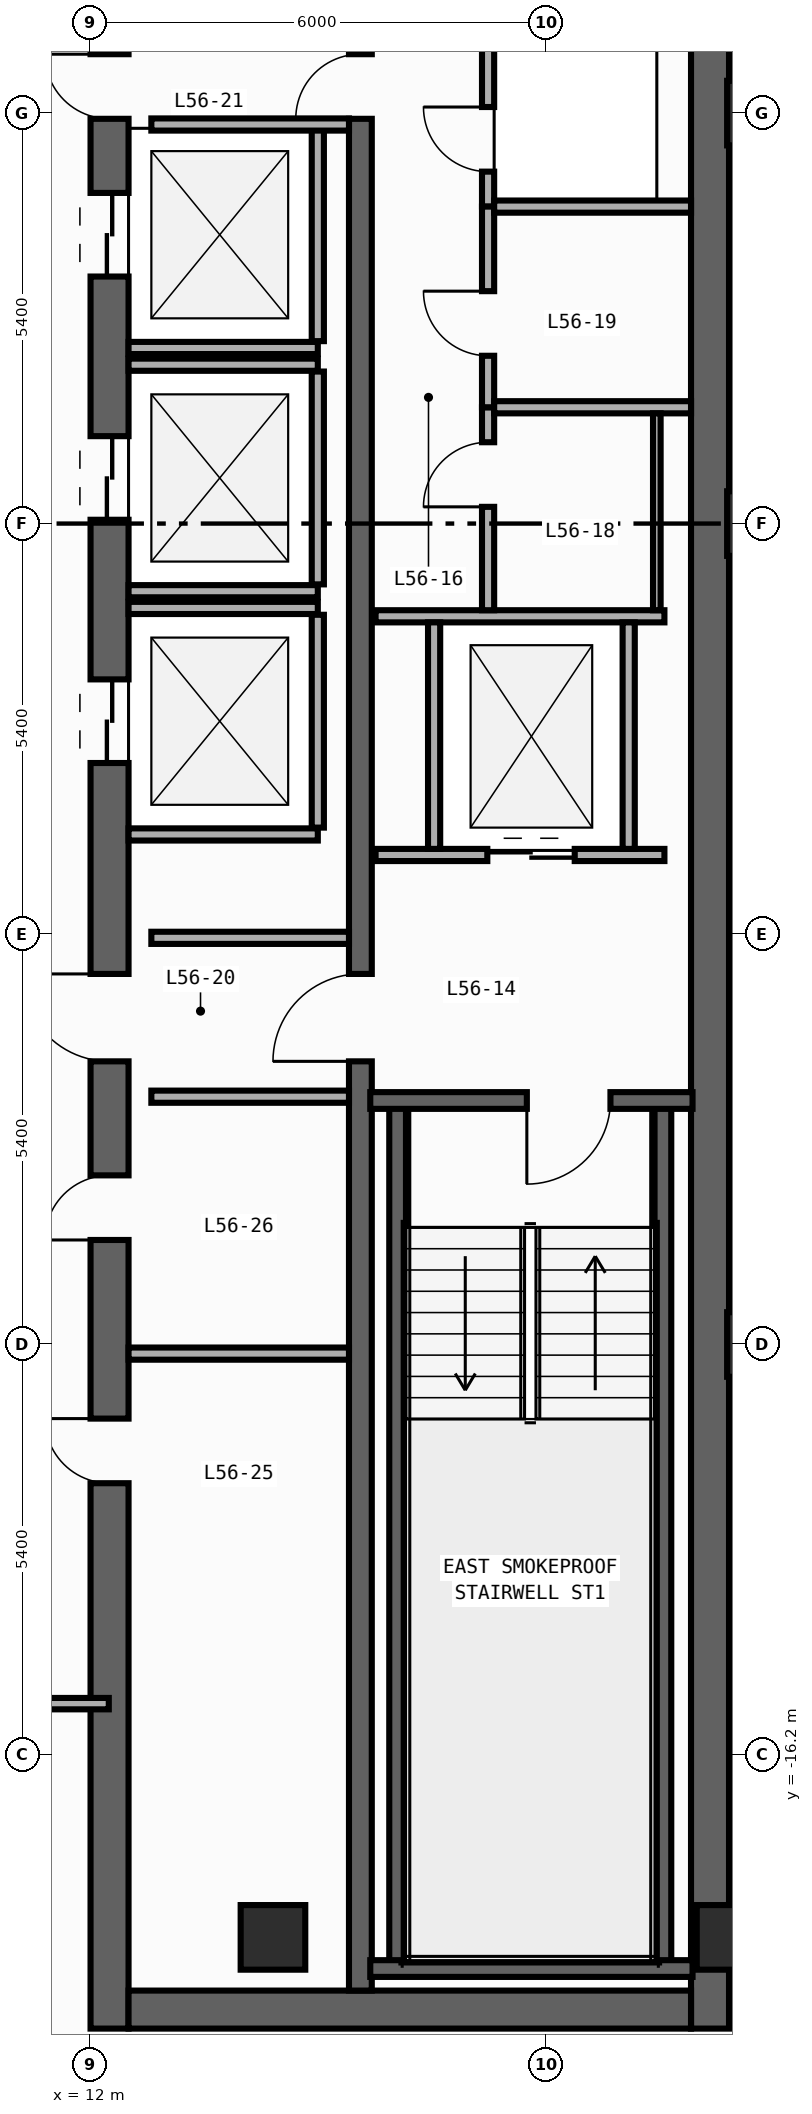
"""IFC4 building model, lengths in metres.
Left out: names, types, materials, properties, quantities, classifications, styles, units other than length and angle.
Written with IfcOpenShell. Run it as: python <this file> out.ifc"""

import sys

from ifc_helpers import new_model, si_unit, direction, frame, frame_2d, origin, origin_2d, place, context, subcontext, project, spatial, rectangle, extrude, element, fill, save


model = new_model("IFC4")
c1 = context("Model", 3, precision=1e-05, world=origin(), true_north=direction((0.0, 1.0)))
c2 = subcontext(c1, "Body", "Model", "MODEL_VIEW")
j1 = project(units=[si_unit("LENGTHUNIT", "METRE"), si_unit("PLANEANGLEUNIT", "RADIAN")], contexts=[c1])
p1 = place(None, origin())
s1 = spatial("IfcSite", under=j1, at=p1, CompositionType="ELEMENT")
p2 = place(p1, origin())
s2 = spatial("IfcBuilding", under=s1, at=p2, CompositionType="ELEMENT")
p3 = place(p2, frame((0.0, 0.0, 240.4)))
s3 = spatial("IfcBuildingStorey", under=s2, at=p3, CompositionType="ELEMENT", Elevation=240.4)
p4 = place(p3, frame((12.25, -19.8, 0.0), z_axis=(0.0, 0.0, 1.0), x_axis=(0.0, 1.0, 0.0)))
e1 = element("IfcWall", 1, at=p4, inside=s3, PredefinedType="SHEAR", context=c2, shape_type="SweptSolid", body=[
    extrude(rectangle(XDim=27.0, YDim=0.5, at=frame_2d((13.5, 0.0))), origin(), (0.0, 0.0, 1.0), 3.34),
])
p5 = place(p4, frame((23.05, 0.0, 0.0)))
e2 = element("IfcOpeningElement", 2, at=p5, cuts=e1, PredefinedType="OPENING", context=c2, shape_type="SweptSolid", body=[
    extrude(rectangle(XDim=1.1, YDim=2.2, at=frame_2d((0.55, 1.1))), frame((0.0, 0.26, 0.0), z_axis=(0.0, -1.0, 0.0), x_axis=(1.0, 0.0, 0.0)), (0.0, 0.0, 1.0), 0.52),
])
p6 = place(p4, frame((19.85, 0.0, 0.0)))
e3 = element("IfcOpeningElement", 3, at=p6, cuts=e1, PredefinedType="OPENING", context=c2, shape_type="SweptSolid", body=[
    extrude(rectangle(XDim=1.1, YDim=2.2, at=frame_2d((0.55, 1.1))), frame((0.0, 0.26, 0.0), z_axis=(0.0, -1.0, 0.0), x_axis=(1.0, 0.0, 0.0)), (0.0, 0.0, 1.0), 0.52),
])
p7 = place(p4, frame((16.65, 0.0, 0.0)))
e4 = element("IfcOpeningElement", 4, at=p7, cuts=e1, PredefinedType="OPENING", context=c2, shape_type="SweptSolid", body=[
    extrude(rectangle(XDim=1.1, YDim=2.2, at=frame_2d((0.55, 1.1))), frame((0.0, 0.26, 0.0), z_axis=(0.0, -1.0, 0.0), x_axis=(1.0, 0.0, 0.0)), (0.0, 0.0, 1.0), 0.52),
])
p8 = place(p4, frame((7.175, 0.0, 0.0)))
e5 = element("IfcOpeningElement", 5, at=p8, cuts=e1, PredefinedType="OPENING", context=c2, shape_type="SweptSolid", body=[
    extrude(rectangle(XDim=0.85, YDim=2.1, at=frame_2d((0.425, 1.05))), frame((0.0, 0.26, 0.0), z_axis=(0.0, -1.0, 0.0), x_axis=(1.0, 0.0, 0.0)), (0.0, 0.0, 1.0), 0.52),
])
p9 = place(p4, frame((10.375, 0.0, 0.0)))
e6 = element("IfcOpeningElement", 6, at=p9, cuts=e1, PredefinedType="OPENING", context=c2, shape_type="SweptSolid", body=[
    extrude(rectangle(XDim=0.85, YDim=2.1, at=frame_2d((0.425, 1.05))), frame((0.0, 0.26, 0.0), z_axis=(0.0, -1.0, 0.0), x_axis=(1.0, 0.0, 0.0)), (0.0, 0.0, 1.0), 0.52),
])
p10 = place(p4, frame((12.725, 0.0, 0.0)))
e7 = element("IfcOpeningElement", 7, at=p10, cuts=e1, PredefinedType="OPENING", context=c2, shape_type="SweptSolid", body=[
    extrude(rectangle(XDim=1.15, YDim=2.2, at=frame_2d((0.575, 1.1))), frame((0.0, 0.26, 0.0), z_axis=(0.0, -1.0, 0.0), x_axis=(1.0, 0.0, 0.0)), (0.0, 0.0, 1.0), 0.52),
])
p11 = place(p4, frame((25.125, 0.0, 0.0)))
e8 = element("IfcOpeningElement", 8, at=p11, cuts=e1, PredefinedType="OPENING", context=c2, shape_type="SweptSolid", body=[
    extrude(rectangle(XDim=0.85, YDim=2.1, at=frame_2d((0.425, 1.05))), frame((0.0, 0.26, 0.0), z_axis=(0.0, -1.0, 0.0), x_axis=(1.0, 0.0, 0.0)), (0.0, 0.0, 1.0), 0.52),
])
p12 = place(p3, frame((20.15, -19.8, 0.0), z_axis=(0.0, 0.0, 1.0), x_axis=(0.0, 1.0, 0.0)))
e9 = element("IfcWall", 9, at=p12, inside=s3, PredefinedType="SHEAR", context=c2, shape_type="SweptSolid", body=[
    extrude(rectangle(XDim=27.0, YDim=0.5, at=frame_2d((13.5, 0.0))), origin(), (0.0, 0.0, 1.0), 3.34),
])
p13 = place(p3, frame((12.5, -19.55, 0.0), z_axis=(0.0, 0.0, 1.0), x_axis=(1.0, 0.0, 0.0)))
e10 = element("IfcWall", 10, at=p13, inside=s3, PredefinedType="SHEAR", context=c2, shape_type="SweptSolid", body=[
    extrude(rectangle(XDim=7.4, YDim=0.5, at=frame_2d((3.7, 0.0))), origin(), (0.0, 0.0, 1.0), 3.34),
])
p14 = place(p3, frame((15.55, -19.3, 0.0), z_axis=(0.0, 0.0, 1.0), x_axis=(0.0, 1.0, 0.0)))
e11 = element("IfcWall", 11, at=p14, inside=s3, PredefinedType="SHEAR", context=c2, shape_type="SweptSolid", body=[
    extrude(rectangle(XDim=26.0, YDim=0.3, at=frame_2d((13.0, 0.0))), origin(), (0.0, 0.0, 1.0), 3.34),
])
p15 = place(p14, frame((12.225, 0.0, 0.0)))
e12 = element("IfcOpeningElement", 12, at=p15, cuts=e11, PredefinedType="OPENING", context=c2, shape_type="SweptSolid", body=[
    extrude(rectangle(XDim=1.15, YDim=2.2, at=frame_2d((0.575, 1.1))), frame((0.0, 0.16, 0.0), z_axis=(0.0, -1.0, 0.0), x_axis=(1.0, 0.0, 0.0)), (0.0, 0.0, 1.0), 0.32),
])
p16 = place(p14, frame((24.625, 0.0, 0.0)))
e13 = element("IfcOpeningElement", 13, at=p16, cuts=e11, PredefinedType="OPENING", context=c2, shape_type="SweptSolid", body=[
    extrude(rectangle(XDim=0.85, YDim=2.1, at=frame_2d((0.425, 1.05))), frame((0.0, 0.16, 0.0), z_axis=(0.0, -1.0, 0.0), x_axis=(1.0, 0.0, 0.0)), (0.0, 0.0, 1.0), 0.32),
])
for number, where, z_axis, x_axis in (
    (14, (16.04, -19.01, 0.0), (0.0, 0.0, 1.0), (0.0, 1.0, 0.0)),
    (15, (19.53, -19.01, 0.0), (0.0, 0.0, 1.0), (0.0, 1.0, 0.0)),
):
    element("IfcWall", number, at=place(p3, frame(where, z_axis=z_axis, x_axis=x_axis)), inside=s3, PredefinedType="SHEAR", context=c2, shape_type="SweptSolid", body=[
        extrude(rectangle(XDim=11.42, YDim=0.22, at=frame_2d((5.71, 0.0))), origin(), (0.0, 0.0, 1.0), 3.34),
    ])
p17 = place(p3, frame((15.68, -19.01, 0.0), z_axis=(0.0, 0.0, 1.0), x_axis=(1.0, 0.0, 0.0)))
e16 = element("IfcWall", 16, at=p17, inside=s3, PredefinedType="SHEAR", context=c2, shape_type="SweptSolid", body=[
    extrude(rectangle(XDim=4.24, YDim=0.22, at=frame_2d((2.12, 0.0))), origin(), (0.0, 0.0, 1.0), 3.34),
])
p18 = place(p3, frame((19.92, -7.59, 0.0), z_axis=(0.0, 0.0, 1.0), x_axis=(-1.0, 0.0, 0.0)))
e17 = element("IfcWall", 17, at=p18, inside=s3, PredefinedType="SHEAR", context=c2, shape_type="SweptSolid", body=[
    extrude(rectangle(XDim=4.24, YDim=0.22, at=frame_2d((2.12, 0.0))), origin(), (0.0, 0.0, 1.0), 3.34),
])
p19 = place(p18, frame((1.08, 0.0, 0.0)))
e18 = element("IfcOpeningElement", 18, at=p19, cuts=e17, PredefinedType="OPENING", context=c2, shape_type="SweptSolid", body=[
    extrude(rectangle(XDim=1.1, YDim=2.2, at=frame_2d((0.55, 1.1))), frame((0.0, 0.12, 0.0), z_axis=(0.0, -1.0, 0.0), x_axis=(1.0, 0.0, 0.0)), (0.0, 0.0, 1.0), 0.24),
])
for number, where, z_axis, x_axis in (
    (19, (20.4, -18.6, 0.0), (0.0, 0.0, 1.0), (1.0, 0.0, 0.0)),
    (20, (14.4, -18.6, 0.0), (0.0, 0.0, 1.0), (1.0, 0.0, 0.0)),
    (21, (20.8, -10.8, 0.0), (0.0, 0.0, 1.0), (1.0, 0.0, 0.0)),
    (22, (20.8, 0.0, 0.0), (0.0, 0.0, 1.0), (1.0, 0.0, 0.0)),
    (23, (20.8, 5.4, 0.0), (0.0, 0.0, 1.0), (1.0, 0.0, 0.0)),
):
    element("IfcColumn", number, at=place(p3, frame(where, z_axis=z_axis, x_axis=x_axis)), inside=s3, PredefinedType="COLUMN", context=c2, shape_type="SweptSolid", body=[
        extrude(rectangle(XDim=0.85, YDim=0.85, at=origin_2d()), origin(), (0.0, 0.0, 1.0), 3.6),
    ])
p20 = place(p3, frame((12.5, 2.31, 0.0), z_axis=(0.0, 0.0, 1.0), x_axis=(1.0, 0.0, 0.0)))
e24 = element("IfcWall", 24, at=p20, inside=s3, PredefinedType="STANDARD", context=c2, shape_type="SweptSolid", body=[
    extrude(rectangle(XDim=2.49, YDim=0.16, at=frame_2d((1.245, 0.0))), origin(), (0.0, 0.0, 1.0), 3.34),
])
p21 = place(p3, frame((14.99, 2.4, 0.0), z_axis=(0.0, 0.0, 1.0), x_axis=(0.0, 1.0, 0.0)))
e25 = element("IfcWall", 25, at=p21, inside=s3, PredefinedType="STANDARD", context=c2, shape_type="SweptSolid", body=[
    extrude(rectangle(XDim=2.8, YDim=0.16, at=frame_2d((1.4, 0.0))), origin(), (0.0, 0.0, 1.0), 3.34),
])
for number, where, z_axis, x_axis in (
    (26, (12.5, -0.89, 0.0), (0.0, 0.0, 1.0), (1.0, 0.0, 0.0)),
    (27, (12.5, 2.09, 0.0), (0.0, 0.0, 1.0), (1.0, 0.0, 0.0)),
):
    element("IfcWall", number, at=place(p3, frame(where, z_axis=z_axis, x_axis=x_axis)), inside=s3, PredefinedType="STANDARD", context=c2, shape_type="SweptSolid", body=[
        extrude(rectangle(XDim=2.49, YDim=0.16, at=frame_2d((1.245, 0.0))), origin(), (0.0, 0.0, 1.0), 3.34),
    ])
p22 = place(p3, frame((14.99, -0.8, 0.0), z_axis=(0.0, 0.0, 1.0), x_axis=(0.0, 1.0, 0.0)))
e28 = element("IfcWall", 28, at=p22, inside=s3, PredefinedType="STANDARD", context=c2, shape_type="SweptSolid", body=[
    extrude(rectangle(XDim=2.8, YDim=0.16, at=frame_2d((1.4, 0.0))), origin(), (0.0, 0.0, 1.0), 3.34),
])
for number, where, z_axis, x_axis in (
    (29, (12.5, -4.09, 0.0), (0.0, 0.0, 1.0), (1.0, 0.0, 0.0)),
    (30, (12.5, -1.11, 0.0), (0.0, 0.0, 1.0), (1.0, 0.0, 0.0)),
):
    element("IfcWall", number, at=place(p3, frame(where, z_axis=z_axis, x_axis=x_axis)), inside=s3, PredefinedType="STANDARD", context=c2, shape_type="SweptSolid", body=[
        extrude(rectangle(XDim=2.49, YDim=0.16, at=frame_2d((1.245, 0.0))), origin(), (0.0, 0.0, 1.0), 3.34),
    ])
p23 = place(p3, frame((14.99, -4.0, 0.0), z_axis=(0.0, 0.0, 1.0), x_axis=(0.0, 1.0, 0.0)))
e31 = element("IfcWall", 31, at=p23, inside=s3, PredefinedType="STANDARD", context=c2, shape_type="SweptSolid", body=[
    extrude(rectangle(XDim=2.8, YDim=0.16, at=frame_2d((1.4, 0.0))), origin(), (0.0, 0.0, 1.0), 3.34),
])
p24 = place(p3, frame((15.75, -4.36, 0.0), z_axis=(0.0, 0.0, 1.0), x_axis=(1.0, 0.0, 0.0)))
e32 = element("IfcWall", 32, at=p24, inside=s3, PredefinedType="STANDARD", context=c2, shape_type="SweptSolid", body=[
    extrude(rectangle(XDim=3.8, YDim=0.16, at=frame_2d((1.9, 0.0))), origin(), (0.0, 0.0, 1.0), 3.34),
])
p25 = place(p24, frame((1.47, 0.0, 0.0)))
e33 = element("IfcOpeningElement", 33, at=p25, cuts=e32, PredefinedType="OPENING", context=c2, shape_type="SweptSolid", body=[
    extrude(rectangle(XDim=1.15, YDim=2.2, at=frame_2d((0.575, 1.1))), frame((0.0, 0.09, 0.0), z_axis=(0.0, -1.0, 0.0), x_axis=(1.0, 0.0, 0.0)), (0.0, 0.0, 1.0), 0.18),
])
p26 = place(p3, frame((15.75, -1.22, 0.0), z_axis=(0.0, 0.0, 1.0), x_axis=(1.0, 0.0, 0.0)))
e34 = element("IfcWall", 34, at=p26, inside=s3, PredefinedType="STANDARD", context=c2, shape_type="SweptSolid", body=[
    extrude(rectangle(XDim=3.8, YDim=0.16, at=frame_2d((1.9, 0.0))), origin(), (0.0, 0.0, 1.0), 3.34),
])
for number, where, z_axis, x_axis in (
    (35, (16.52, -4.28, 0.0), (0.0, 0.0, 1.0), (0.0, 1.0, 0.0)),
    (36, (19.08, -4.28, 0.0), (0.0, 0.0, 1.0), (0.0, 1.0, 0.0)),
):
    element("IfcWall", number, at=place(p3, frame(where, z_axis=z_axis, x_axis=x_axis)), inside=s3, PredefinedType="STANDARD", context=c2, shape_type="SweptSolid", body=[
        extrude(rectangle(XDim=2.98, YDim=0.16, at=frame_2d((1.49, 0.0))), origin(), (0.0, 0.0, 1.0), 3.34),
    ])
for number, where, z_axis, x_axis in (
    (37, (12.8, -5.45, 0.0), (0.0, 0.0, 1.0), (1.0, 0.0, 0.0)),
    (38, (12.8, -7.54, 0.0), (0.0, 0.0, 1.0), (1.0, 0.0, 0.0)),
    (39, (12.8, 5.25, 0.0), (0.0, 0.0, 1.0), (1.0, 0.0, 0.0)),
):
    element("IfcWall", number, at=place(p3, frame(where, z_axis=z_axis, x_axis=x_axis)), inside=s3, PredefinedType="STANDARD", context=c2, shape_type="SweptSolid", body=[
        extrude(rectangle(XDim=2.6, YDim=0.16, at=frame_2d((1.3, 0.0))), origin(), (0.0, 0.0, 1.0), 3.34),
    ])
p27 = place(p3, frame((17.23, 4.17, 0.0), z_axis=(0.0, 0.0, 1.0), x_axis=(0.0, 1.0, 0.0)))
e40 = element("IfcWall", 40, at=p27, inside=s3, PredefinedType="PARTITIONING", context=c2, shape_type="SweptSolid", body=[
    extrude(rectangle(XDim=2.32, YDim=0.16, at=frame_2d((1.16, 0.0))), origin(), (0.0, 0.0, 1.0), 3.34),
])
p28 = place(p27, frame((0.46, 0.0, 0.0)))
e41 = element("IfcOpeningElement", 41, at=p28, cuts=e40, PredefinedType="OPENING", context=c2, shape_type="SweptSolid", body=[
    extrude(rectangle(XDim=0.85, YDim=2.1, at=frame_2d((0.425, 1.05))), frame((0.0, 0.09, 0.0), z_axis=(0.0, -1.0, 0.0), x_axis=(1.0, 0.0, 0.0)), (0.0, 0.0, 1.0), 0.18),
])
p29 = place(p3, frame((17.23, -1.14, 0.0), z_axis=(0.0, 0.0, 1.0), x_axis=(0.0, 1.0, 0.0)))
e42 = element("IfcWall", 42, at=p29, inside=s3, PredefinedType="PARTITIONING", context=c2, shape_type="SweptSolid", body=[
    extrude(rectangle(XDim=2.67, YDim=0.16, at=frame_2d((1.335, 0.0))), origin(), (0.0, 0.0, 1.0), 3.34),
])
p30 = place(p29, frame((1.36, 0.0, 0.0)))
e43 = element("IfcOpeningElement", 43, at=p30, cuts=e42, PredefinedType="OPENING", context=c2, shape_type="SweptSolid", body=[
    extrude(rectangle(XDim=0.85, YDim=2.1, at=frame_2d((0.425, 1.05))), frame((0.0, 0.09, 0.0), z_axis=(0.0, -1.0, 0.0), x_axis=(1.0, 0.0, 0.0)), (0.0, 0.0, 1.0), 0.18),
])
p31 = place(p3, frame((17.23, 1.53, 0.0), z_axis=(0.0, 0.0, 1.0), x_axis=(0.0, 1.0, 0.0)))
e44 = element("IfcWall", 44, at=p31, inside=s3, PredefinedType="PARTITIONING", context=c2, shape_type="SweptSolid", body=[
    extrude(rectangle(XDim=2.64, YDim=0.16, at=frame_2d((1.32, 0.0))), origin(), (0.0, 0.0, 1.0), 3.34),
])
p32 = place(p31, frame((0.677, 0.0, 0.0)))
e45 = element("IfcOpeningElement", 45, at=p32, cuts=e44, PredefinedType="OPENING", context=c2, shape_type="SweptSolid", body=[
    extrude(rectangle(XDim=0.85, YDim=2.1, at=frame_2d((0.425, 1.05))), frame((0.0, 0.09, 0.0), z_axis=(0.0, -1.0, 0.0), x_axis=(1.0, 0.0, 0.0)), (0.0, 0.0, 1.0), 0.18),
])
for number, where, z_axis, x_axis in (
    (46, (17.31, 4.17, 0.0), (0.0, 0.0, 1.0), (1.0, 0.0, 0.0)),
    (47, (17.31, 1.53, 0.0), (0.0, 0.0, 1.0), (1.0, 0.0, 0.0)),
):
    element("IfcWall", number, at=place(p3, frame(where, z_axis=z_axis, x_axis=x_axis)), inside=s3, PredefinedType="PARTITIONING", context=c2, shape_type="SweptSolid", body=[
        extrude(rectangle(XDim=2.59, YDim=0.16, at=frame_2d((1.295, 0.0))), origin(), (0.0, 0.0, 1.0), 3.34),
    ])
p33 = place(p3, frame((12.5, -10.92, 0.0), z_axis=(0.0, 0.0, 1.0), x_axis=(1.0, 0.0, 0.0)))
e48 = element("IfcWall", 48, at=p33, inside=s3, PredefinedType="PARTITIONING", context=c2, shape_type="SweptSolid", body=[
    extrude(rectangle(XDim=2.9, YDim=0.16, at=frame_2d((1.45, 0.0))), origin(), (0.0, 0.0, 1.0), 2.44),
])
p34 = place(p3, frame((7.805, -15.525, 0.0), z_axis=(0.0, 0.0, 1.0), x_axis=(1.0, 0.0, 0.0)))
e49 = element("IfcWall", 49, at=p34, inside=s3, PredefinedType="PARTITIONING", context=c2, shape_type="SweptSolid", body=[
    extrude(rectangle(XDim=4.435, YDim=0.15, at=frame_2d((2.218, 0.0))), origin(), (0.0, 0.0, 1.0), 3.34),
])
p35 = place(p3, frame((19.45, 1.45, 0.0), z_axis=(0.0, 0.0, 1.0), x_axis=(0.0, -1.0, 0.0)))
e50 = element("IfcWall", 50, at=p35, inside=s3, PredefinedType="PARTITIONING", context=c2, shape_type="SweptSolid", body=[
    extrude(rectangle(XDim=2.59, YDim=0.1, at=frame_2d((1.295, 0.0))), origin(), (0.0, 0.0, 1.0), 3.34),
])
p36 = place(p19, origin())
e51 = element("IfcDoor", 51, at=p36, inside=s3, OperationType="SINGLE_SWING_RIGHT", PredefinedType="DOOR", context=c2, shape_type="SweptSolid", body=[
    extrude(rectangle(XDim=1.1, YDim=2.2, at=frame_2d((0.55, 1.1))), frame((0.0, 0.025, 0.0), z_axis=(0.0, -1.0, 0.0), x_axis=(1.0, 0.0, 0.0)), (0.0, 0.0, 1.0), 0.05),
])
fill(e18, e51)
p37 = place(p5, origin())
e52 = element("IfcDoor", 52, at=p37, inside=s3, OperationType="DOUBLE_DOOR_SLIDING", PredefinedType="DOOR", context=c2, shape_type="SweptSolid", body=[
    extrude(rectangle(XDim=1.1, YDim=2.2, at=frame_2d((0.55, 1.1))), frame((0.0, 0.025, 0.0), z_axis=(0.0, -1.0, 0.0), x_axis=(1.0, 0.0, 0.0)), (0.0, 0.0, 1.0), 0.05),
])
fill(e2, e52)
p38 = place(p6, origin())
e53 = element("IfcDoor", 53, at=p38, inside=s3, OperationType="DOUBLE_DOOR_SLIDING", PredefinedType="DOOR", context=c2, shape_type="SweptSolid", body=[
    extrude(rectangle(XDim=1.1, YDim=2.2, at=frame_2d((0.55, 1.1))), frame((0.0, 0.025, 0.0), z_axis=(0.0, -1.0, 0.0), x_axis=(1.0, 0.0, 0.0)), (0.0, 0.0, 1.0), 0.05),
])
fill(e3, e53)
p39 = place(p7, origin())
e54 = element("IfcDoor", 54, at=p39, inside=s3, OperationType="DOUBLE_DOOR_SLIDING", PredefinedType="DOOR", context=c2, shape_type="SweptSolid", body=[
    extrude(rectangle(XDim=1.1, YDim=2.2, at=frame_2d((0.55, 1.1))), frame((0.0, 0.025, 0.0), z_axis=(0.0, -1.0, 0.0), x_axis=(1.0, 0.0, 0.0)), (0.0, 0.0, 1.0), 0.05),
])
fill(e4, e54)
p40 = place(p8, origin())
e55 = element("IfcDoor", 55, at=p40, inside=s3, OperationType="SINGLE_SWING_RIGHT", PredefinedType="DOOR", context=c2, shape_type="SweptSolid", body=[
    extrude(rectangle(XDim=0.85, YDim=2.1, at=frame_2d((0.425, 1.05))), frame((0.0, 0.025, 0.0), z_axis=(0.0, -1.0, 0.0), x_axis=(1.0, 0.0, 0.0)), (0.0, 0.0, 1.0), 0.05),
])
fill(e5, e55)
p41 = place(p9, origin())
e56 = element("IfcDoor", 56, at=p41, inside=s3, OperationType="SINGLE_SWING_LEFT", PredefinedType="DOOR", context=c2, shape_type="SweptSolid", body=[
    extrude(rectangle(XDim=0.85, YDim=2.1, at=frame_2d((0.425, 1.05))), frame((0.0, 0.025, 0.0), z_axis=(0.0, -1.0, 0.0), x_axis=(1.0, 0.0, 0.0)), (0.0, 0.0, 1.0), 0.05),
])
fill(e6, e56)
p42 = place(p10, origin())
e57 = element("IfcDoor", 57, at=p42, inside=s3, OperationType="SINGLE_SWING_RIGHT", PredefinedType="DOOR", context=c2, shape_type="SweptSolid", body=[
    extrude(rectangle(XDim=1.15, YDim=2.2, at=frame_2d((0.575, 1.1))), frame((0.0, 0.025, 0.0), z_axis=(0.0, -1.0, 0.0), x_axis=(1.0, 0.0, 0.0)), (0.0, 0.0, 1.0), 0.05),
])
fill(e7, e57)
p43 = place(p15, origin())
e58 = element("IfcDoor", 58, at=p43, inside=s3, OperationType="SINGLE_SWING_LEFT", PredefinedType="DOOR", context=c2, shape_type="SweptSolid", body=[
    extrude(rectangle(XDim=1.15, YDim=2.2, at=frame_2d((0.575, 1.1))), frame((0.0, 0.025, 0.0), z_axis=(0.0, -1.0, 0.0), x_axis=(1.0, 0.0, 0.0)), (0.0, 0.0, 1.0), 0.05),
])
fill(e12, e58)
p44 = place(p11, origin())
e59 = element("IfcDoor", 59, at=p44, inside=s3, OperationType="SINGLE_SWING_RIGHT", PredefinedType="DOOR", context=c2, shape_type="SweptSolid", body=[
    extrude(rectangle(XDim=0.85, YDim=2.1, at=frame_2d((0.425, 1.05))), frame((0.0, 0.025, 0.0), z_axis=(0.0, -1.0, 0.0), x_axis=(1.0, 0.0, 0.0)), (0.0, 0.0, 1.0), 0.05),
])
fill(e8, e59)
p45 = place(p16, origin())
e60 = element("IfcDoor", 60, at=p45, inside=s3, OperationType="SINGLE_SWING_LEFT", PredefinedType="DOOR", context=c2, shape_type="SweptSolid", body=[
    extrude(rectangle(XDim=0.85, YDim=2.1, at=frame_2d((0.425, 1.05))), frame((0.0, 0.025, 0.0), z_axis=(0.0, -1.0, 0.0), x_axis=(1.0, 0.0, 0.0)), (0.0, 0.0, 1.0), 0.05),
])
fill(e13, e60)
p46 = place(p25, origin())
e61 = element("IfcDoor", 61, at=p46, inside=s3, OperationType="DOUBLE_DOOR_SLIDING", PredefinedType="DOOR", context=c2, shape_type="SweptSolid", body=[
    extrude(rectangle(XDim=1.15, YDim=2.2, at=frame_2d((0.575, 1.1))), frame((0.0, 0.025, 0.0), z_axis=(0.0, -1.0, 0.0), x_axis=(1.0, 0.0, 0.0)), (0.0, 0.0, 1.0), 0.05),
])
fill(e33, e61)
p47 = place(p28, origin())
e62 = element("IfcDoor", 62, at=p47, inside=s3, OperationType="SINGLE_SWING_RIGHT", PredefinedType="DOOR", context=c2, shape_type="SweptSolid", body=[
    extrude(rectangle(XDim=0.85, YDim=2.1, at=frame_2d((0.425, 1.05))), frame((0.0, 0.025, 0.0), z_axis=(0.0, -1.0, 0.0), x_axis=(1.0, 0.0, 0.0)), (0.0, 0.0, 1.0), 0.05),
])
fill(e41, e62)
p48 = place(p30, origin())
e63 = element("IfcDoor", 63, at=p48, inside=s3, OperationType="SINGLE_SWING_LEFT", PredefinedType="DOOR", context=c2, shape_type="SweptSolid", body=[
    extrude(rectangle(XDim=0.85, YDim=2.1, at=frame_2d((0.425, 1.05))), frame((0.0, 0.025, 0.0), z_axis=(0.0, -1.0, 0.0), x_axis=(1.0, 0.0, 0.0)), (0.0, 0.0, 1.0), 0.05),
])
fill(e43, e63)
p49 = place(p32, origin())
e64 = element("IfcDoor", 64, at=p49, inside=s3, OperationType="SINGLE_SWING_RIGHT", PredefinedType="DOOR", context=c2, shape_type="SweptSolid", body=[
    extrude(rectangle(XDim=0.85, YDim=2.1, at=frame_2d((0.425, 1.05))), frame((0.0, 0.025, 0.0), z_axis=(0.0, -1.0, 0.0), x_axis=(1.0, 0.0, 0.0)), (0.0, 0.0, 1.0), 0.05),
])
fill(e45, e64)
save(model, sys.argv[1])
